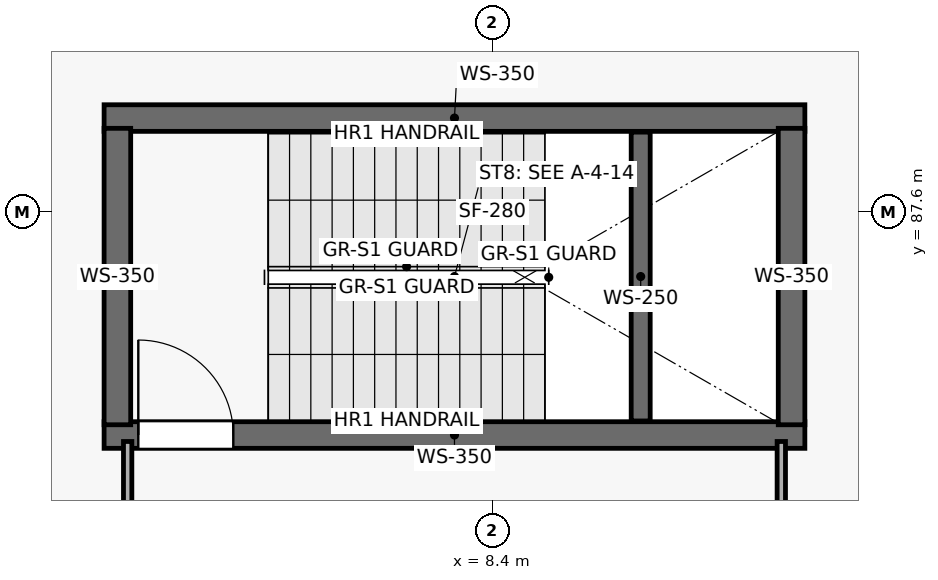
"""IFC4 building model, lengths in metres.
Left out: names, types, materials, properties, quantities, classifications, styles, units other than length and angle.
Written with IfcOpenShell. Run it as: python <this file> out.ifc"""

import sys

from ifc_helpers import new_model, si_unit, direction, frame, frame_2d, origin, place, context, subcontext, project, spatial, rectangle, extrude, element, fill, save


model = new_model("IFC4")
c1 = context("Model", 3, precision=1e-05, world=origin(), true_north=direction((0.0, 1.0)))
c2 = subcontext(c1, "Body", "Model", "MODEL_VIEW")
j1 = project(units=[si_unit("LENGTHUNIT", "METRE"), si_unit("PLANEANGLEUNIT", "RADIAN")], contexts=[c1])
p1 = place(None, origin())
s1 = spatial("IfcSite", under=j1, at=p1, CompositionType="ELEMENT")
p2 = place(p1, origin())
s2 = spatial("IfcBuilding", under=s1, at=p2, CompositionType="ELEMENT")
p3 = place(p2, frame((0.0, 0.0, 15.3)))
s3 = spatial("IfcBuildingStorey", under=s2, at=p3, CompositionType="ELEMENT", Elevation=15.3)
p4 = place(p3, frame((3.29, 84.665, 0.0), z_axis=(0.0, 0.0, 1.0), x_axis=(1.0, 0.0, 0.0)))
e1 = element("IfcWall", 1, at=p4, inside=s3, PredefinedType="SHEAR", context=c2, shape_type="SweptSolid", body=[
    extrude(rectangle(XDim=9.22, YDim=0.35, at=frame_2d((4.61, 0.0))), origin(), (0.0, 0.0, 1.0), 4.82),
])
p5 = place(p4, frame((0.45, 0.0, 0.0)))
e2 = element("IfcOpeningElement", 2, at=p5, cuts=e1, PredefinedType="OPENING", context=c2, shape_type="SweptSolid", body=[
    extrude(rectangle(XDim=1.25, YDim=2.2, at=frame_2d((0.625, 1.1))), frame((0.0, 0.185, 0.0), z_axis=(0.0, -1.0, 0.0), x_axis=(1.0, 0.0, 0.0)), (0.0, 0.0, 1.0), 0.37),
])
p6 = place(p3, frame((12.51, 88.835, 0.0), z_axis=(0.0, 0.0, 1.0), x_axis=(-1.0, 0.0, 0.0)))
e3 = element("IfcWall", 3, at=p6, inside=s3, PredefinedType="SHEAR", context=c2, shape_type="SweptSolid", body=[
    extrude(rectangle(XDim=9.22, YDim=0.35, at=frame_2d((4.61, 0.0))), origin(), (0.0, 0.0, 1.0), 4.82),
])
for number, where, z_axis, x_axis in (
    (4, (3.465, 84.8, 0.0), (0.0, 0.0, 1.0), (0.0, 1.0, 0.0)),
    (5, (12.335, 88.7, 0.0), (0.0, 0.0, 1.0), (0.0, -1.0, 0.0)),
):
    element("IfcWall", number, at=place(p3, frame(where, z_axis=z_axis, x_axis=x_axis)), inside=s3, PredefinedType="SHEAR", context=c2, shape_type="SweptSolid", body=[
        extrude(rectangle(XDim=3.9, YDim=0.35, at=frame_2d((1.95, 0.0))), origin(), (0.0, 0.0, 1.0), 4.82),
    ])
p7 = place(p3, frame((10.35, 84.85, 0.0), z_axis=(0.0, 0.0, 1.0), x_axis=(0.0, 1.0, 0.0)))
e6 = element("IfcWall", 6, at=p7, inside=s3, PredefinedType="SHEAR", context=c2, shape_type="SweptSolid", body=[
    extrude(rectangle(XDim=3.8, YDim=0.25, at=frame_2d((1.9, 0.0))), origin(), (0.0, 0.0, 1.0), 2.37),
])
p8 = place(p3, frame((12.2, 81.8, 0.0), z_axis=(0.0, 0.0, 1.0), x_axis=(0.0, 1.0, 0.0)))
e7 = element("IfcWall", 7, at=p8, inside=s3, PredefinedType="PARTITIONING", context=c2, shape_type="SweptSolid", body=[
    extrude(rectangle(XDim=2.78, YDim=0.11, at=frame_2d((1.39, 0.0))), origin(), (0.0, 0.0, 1.0), 4.82),
])
p9 = place(p3, frame((3.6, 84.58, 0.0), z_axis=(0.0, 0.0, 1.0), x_axis=(0.0, -1.0, 0.0)))
e8 = element("IfcWall", 8, at=p9, inside=s3, PredefinedType="PARTITIONING", context=c2, shape_type="SweptSolid", body=[
    extrude(rectangle(XDim=2.645, YDim=0.11, at=frame_2d((1.323, 0.0))), origin(), (0.0, 0.0, 1.0), 4.82),
])
p10 = place(p5, origin())
e9 = element("IfcDoor", 9, at=p10, inside=s3, OperationType="SINGLE_SWING_LEFT", PredefinedType="DOOR", context=c2, shape_type="SweptSolid", body=[
    extrude(rectangle(XDim=1.25, YDim=2.2, at=frame_2d((0.625, 1.1))), frame((0.0, 0.025, 0.0), z_axis=(0.0, -1.0, 0.0), x_axis=(1.0, 0.0, 0.0)), (0.0, 0.0, 1.0), 0.05),
])
fill(e2, e9)
save(model, sys.argv[1])
